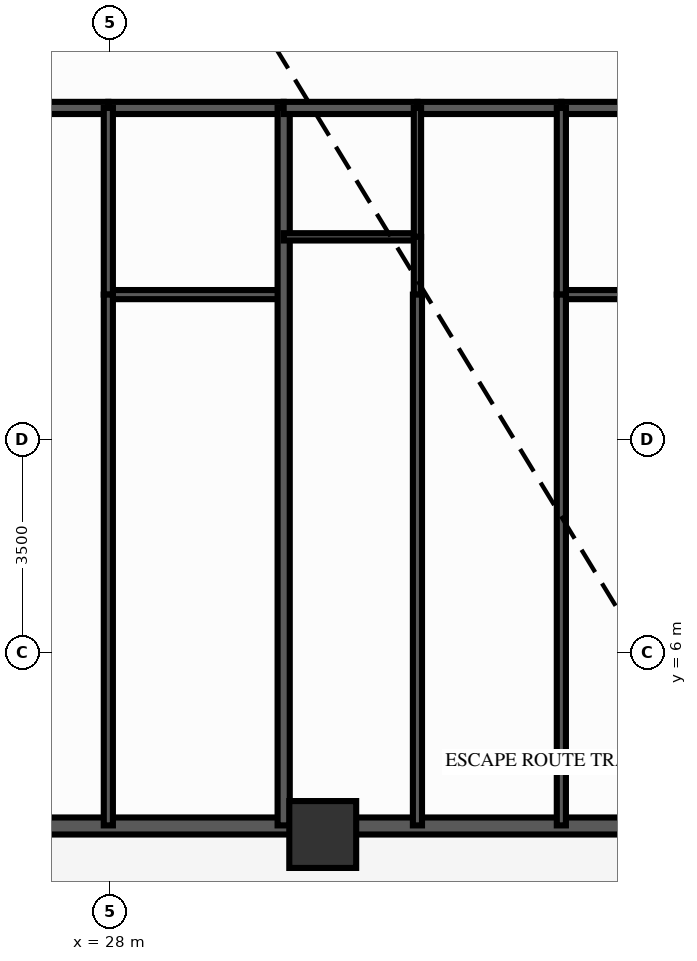
"""IFC4 building model, lengths in metres.
Left out: names, types, materials, properties, quantities, classifications, styles, units other than length and angle.
Written with IfcOpenShell. Run it as: python <this file> out.ifc"""

import sys

from ifc_helpers import new_model, si_unit, direction, frame, frame_2d, origin, origin_2d, place, context, subcontext, project, spatial, rectangle, extrude, source, transform, mapped, element, fill, save


model = new_model("IFC4")
c1 = context("Model", 3, precision=1e-05, world=origin(), true_north=direction((0.0, 1.0)))
c2 = subcontext(c1, "Body", "Model", "MODEL_VIEW")
j1 = project(units=[si_unit("LENGTHUNIT", "METRE"), si_unit("PLANEANGLEUNIT", "RADIAN")], contexts=[c1])
p1 = place(None, origin())
s1 = spatial("IfcSite", under=j1, at=p1, CompositionType="ELEMENT")
p2 = place(p1, origin())
s2 = spatial("IfcBuilding", under=s1, at=p2, CompositionType="ELEMENT")
p3 = place(p2, frame((0.0, 0.0, 19.4)))
s3 = spatial("IfcBuildingStorey", under=s2, at=p3, CompositionType="ELEMENT", Elevation=19.4)
m1 = source(origin(), c2, "Body", "SweptSolid", [
    extrude(rectangle(XDim=1.1, YDim=1.1, at=origin_2d()), origin(), (0.0, 0.0, 1.0), 3.0),
])
p4 = place(p3, frame((31.5, 3.0, 0.0), z_axis=(0.0, 0.0, 1.0), x_axis=(1.0, 0.0, 0.0)))
e1 = element("IfcColumn", 1, at=p4, inside=s3, PredefinedType="COLUMN", context=c2, shape_type="MappedRepresentation", body=[
    mapped(m1, transform((0.0, 0.0, 0.0), scale=1.0)),
])
p5 = place(p3, frame((15.5, 3.14, 0.0), z_axis=(0.0, 0.0, 1.0), x_axis=(1.0, 0.0, 0.0)))
e2 = element("IfcWall", 2, at=p5, inside=s3, PredefinedType="SOLIDWALL", context=c2, shape_type="SweptSolid", body=[
    extrude(rectangle(XDim=45.0, YDim=0.28, at=frame_2d((22.5, 0.0))), origin(), (0.0, 0.0, 1.0), 2.28),
])
p6 = place(p5, frame((0.785, 0.0, 0.25)))
e3 = element("IfcOpeningElement", 3, at=p6, cuts=e2, PredefinedType="OPENING", context=c2, shape_type="SweptSolid", body=[
    extrude(rectangle(XDim=1.2, YDim=1.5, at=frame_2d((0.6, 0.75))), frame((0.0, 0.152, 0.0), z_axis=(0.0, -1.0, 0.0), x_axis=(1.0, 0.0, 0.0)), (0.0, 0.0, 1.0), 0.304),
])
p7 = place(p5, frame((3.033, 0.0, 0.25)))
e4 = element("IfcOpeningElement", 4, at=p7, cuts=e2, PredefinedType="OPENING", context=c2, shape_type="SweptSolid", body=[
    extrude(rectangle(XDim=1.2, YDim=1.5, at=frame_2d((0.6, 0.75))), frame((0.0, 0.152, 0.0), z_axis=(0.0, -1.0, 0.0), x_axis=(1.0, 0.0, 0.0)), (0.0, 0.0, 1.0), 0.304),
])
p8 = place(p5, frame((5.727, 0.0, 0.25)))
e5 = element("IfcOpeningElement", 5, at=p8, cuts=e2, PredefinedType="OPENING", context=c2, shape_type="SweptSolid", body=[
    extrude(rectangle(XDim=1.2, YDim=1.5, at=frame_2d((0.6, 0.75))), frame((0.0, 0.152, 0.0), z_axis=(0.0, -1.0, 0.0), x_axis=(1.0, 0.0, 0.0)), (0.0, 0.0, 1.0), 0.304),
])
p9 = place(p5, frame((8.269, 0.0, 0.25)))
e6 = element("IfcOpeningElement", 6, at=p9, cuts=e2, PredefinedType="OPENING", context=c2, shape_type="SweptSolid", body=[
    extrude(rectangle(XDim=1.2, YDim=1.5, at=frame_2d((0.6, 0.75))), frame((0.0, 0.152, 0.0), z_axis=(0.0, -1.0, 0.0), x_axis=(1.0, 0.0, 0.0)), (0.0, 0.0, 1.0), 0.304),
])
p10 = place(p5, frame((10.621, 0.0, 0.25)))
e7 = element("IfcOpeningElement", 7, at=p10, cuts=e2, PredefinedType="OPENING", context=c2, shape_type="SweptSolid", body=[
    extrude(rectangle(XDim=1.2, YDim=1.5, at=frame_2d((0.6, 0.75))), frame((0.0, 0.152, 0.0), z_axis=(0.0, -1.0, 0.0), x_axis=(1.0, 0.0, 0.0)), (0.0, 0.0, 1.0), 0.304),
])
p11 = place(p5, frame((13.316, 0.0, 0.25)))
e8 = element("IfcOpeningElement", 8, at=p11, cuts=e2, PredefinedType="OPENING", context=c2, shape_type="SweptSolid", body=[
    extrude(rectangle(XDim=1.2, YDim=1.5, at=frame_2d((0.6, 0.75))), frame((0.0, 0.152, 0.0), z_axis=(0.0, -1.0, 0.0), x_axis=(1.0, 0.0, 0.0)), (0.0, 0.0, 1.0), 0.304),
])
p12 = place(p5, frame((16.624, 0.0, 0.25)))
e9 = element("IfcOpeningElement", 9, at=p12, cuts=e2, PredefinedType="OPENING", context=c2, shape_type="SweptSolid", body=[
    extrude(rectangle(XDim=0.7, YDim=1.5, at=frame_2d((0.35, 0.75))), frame((0.0, 0.152, 0.0), z_axis=(0.0, -1.0, 0.0), x_axis=(1.0, 0.0, 0.0)), (0.0, 0.0, 1.0), 0.304),
])
p13 = place(p5, frame((18.141, 0.0, 0.25)))
e10 = element("IfcOpeningElement", 10, at=p13, cuts=e2, PredefinedType="OPENING", context=c2, shape_type="SweptSolid", body=[
    extrude(rectangle(XDim=1.2, YDim=1.5, at=frame_2d((0.6, 0.75))), frame((0.0, 0.152, 0.0), z_axis=(0.0, -1.0, 0.0), x_axis=(1.0, 0.0, 0.0)), (0.0, 0.0, 1.0), 0.304),
])
p14 = place(p5, frame((21.874, 0.0, 0.0), z_axis=(0.0, 0.0, 1.0), x_axis=(-1.0, 0.0, 0.0)))
e11 = element("IfcOpeningElement", 11, at=p14, cuts=e2, PredefinedType="OPENING", context=c2, shape_type="SweptSolid", body=[
    extrude(rectangle(XDim=1.1, YDim=2.15, at=frame_2d((0.55, 1.075))), frame((0.0, 0.152, 0.0), z_axis=(0.0, -1.0, 0.0), x_axis=(1.0, 0.0, 0.0)), (0.0, 0.0, 1.0), 0.304),
])
p15 = place(p5, frame((23.223, 0.0, 0.25)))
e12 = element("IfcOpeningElement", 12, at=p15, cuts=e2, PredefinedType="OPENING", context=c2, shape_type="SweptSolid", body=[
    extrude(rectangle(XDim=1.2, YDim=1.5, at=frame_2d((0.6, 0.75))), frame((0.0, 0.152, 0.0), z_axis=(0.0, -1.0, 0.0), x_axis=(1.0, 0.0, 0.0)), (0.0, 0.0, 1.0), 0.304),
])
p16 = place(p5, frame((25.507, 0.0, 0.25)))
e13 = element("IfcOpeningElement", 13, at=p16, cuts=e2, PredefinedType="OPENING", context=c2, shape_type="SweptSolid", body=[
    extrude(rectangle(XDim=1.2, YDim=1.5, at=frame_2d((0.6, 0.75))), frame((0.0, 0.152, 0.0), z_axis=(0.0, -1.0, 0.0), x_axis=(1.0, 0.0, 0.0)), (0.0, 0.0, 1.0), 0.304),
])
p17 = place(p5, frame((27.6, 0.0, 0.25)))
e14 = element("IfcOpeningElement", 14, at=p17, cuts=e2, PredefinedType="OPENING", context=c2, shape_type="SweptSolid", body=[
    extrude(rectangle(XDim=0.7, YDim=1.5, at=frame_2d((0.35, 0.75))), frame((0.0, 0.152, 0.0), z_axis=(0.0, -1.0, 0.0), x_axis=(1.0, 0.0, 0.0)), (0.0, 0.0, 1.0), 0.304),
])
p18 = place(p5, frame((30.589, 0.0, 0.25)))
e15 = element("IfcOpeningElement", 15, at=p18, cuts=e2, PredefinedType="OPENING", context=c2, shape_type="SweptSolid", body=[
    extrude(rectangle(XDim=1.2, YDim=1.5, at=frame_2d((0.6, 0.75))), frame((0.0, 0.152, 0.0), z_axis=(0.0, -1.0, 0.0), x_axis=(1.0, 0.0, 0.0)), (0.0, 0.0, 1.0), 0.304),
])
p19 = place(p5, frame((32.872, 0.0, 0.25)))
e16 = element("IfcOpeningElement", 16, at=p19, cuts=e2, PredefinedType="OPENING", context=c2, shape_type="SweptSolid", body=[
    extrude(rectangle(XDim=1.2, YDim=1.5, at=frame_2d((0.6, 0.75))), frame((0.0, 0.152, 0.0), z_axis=(0.0, -1.0, 0.0), x_axis=(1.0, 0.0, 0.0)), (0.0, 0.0, 1.0), 0.304),
])
p20 = place(p5, frame((35.455, 0.0, 0.25)))
e17 = element("IfcOpeningElement", 17, at=p20, cuts=e2, PredefinedType="OPENING", context=c2, shape_type="SweptSolid", body=[
    extrude(rectangle(XDim=1.2, YDim=1.5, at=frame_2d((0.6, 0.75))), frame((0.0, 0.152, 0.0), z_axis=(0.0, -1.0, 0.0), x_axis=(1.0, 0.0, 0.0)), (0.0, 0.0, 1.0), 0.304),
])
p21 = place(p5, frame((37.954, 0.0, 0.25)))
e18 = element("IfcOpeningElement", 18, at=p21, cuts=e2, PredefinedType="OPENING", context=c2, shape_type="SweptSolid", body=[
    extrude(rectangle(XDim=1.2, YDim=1.5, at=frame_2d((0.6, 0.75))), frame((0.0, 0.152, 0.0), z_axis=(0.0, -1.0, 0.0), x_axis=(1.0, 0.0, 0.0)), (0.0, 0.0, 1.0), 0.304),
])
p22 = place(p5, frame((40.238, 0.0, 0.25)))
e19 = element("IfcOpeningElement", 19, at=p22, cuts=e2, PredefinedType="OPENING", context=c2, shape_type="SweptSolid", body=[
    extrude(rectangle(XDim=1.2, YDim=1.5, at=frame_2d((0.6, 0.75))), frame((0.0, 0.152, 0.0), z_axis=(0.0, -1.0, 0.0), x_axis=(1.0, 0.0, 0.0)), (0.0, 0.0, 1.0), 0.304),
])
p23 = place(p5, frame((42.716, 0.0, 0.25)))
e20 = element("IfcOpeningElement", 20, at=p23, cuts=e2, PredefinedType="OPENING", context=c2, shape_type="SweptSolid", body=[
    extrude(rectangle(XDim=1.2, YDim=1.5, at=frame_2d((0.6, 0.75))), frame((0.0, 0.152, 0.0), z_axis=(0.0, -1.0, 0.0), x_axis=(1.0, 0.0, 0.0)), (0.0, 0.0, 1.0), 0.304),
])
p24 = place(p3, frame((25.469, 14.95, 0.0), z_axis=(0.0, 0.0, 1.0), x_axis=(1.0, 0.0, 0.0)))
e21 = element("IfcWall", 21, at=p24, inside=s3, PredefinedType="PARTITIONING", context=c2, shape_type="SweptSolid", body=[
    extrude(rectangle(XDim=2.505, YDim=0.2, at=frame_2d((1.252, 0.0))), origin(), (0.0, 0.0, 1.0), 2.79),
])
p25 = place(p24, frame((0.752, 0.0, 0.0)))
e22 = element("IfcOpeningElement", 22, at=p25, cuts=e21, PredefinedType="OPENING", context=c2, shape_type="SweptSolid", body=[
    extrude(rectangle(XDim=1.0, YDim=2.15, at=frame_2d((0.5, 1.075))), frame((0.0, 0.112, 0.0), z_axis=(0.0, -1.0, 0.0), x_axis=(1.0, 0.0, 0.0)), (0.0, 0.0, 1.0), 0.224),
])
p26 = place(p3, frame((27.974, 14.95, 0.0), z_axis=(0.0, 0.0, 1.0), x_axis=(1.0, 0.0, 0.0)))
e23 = element("IfcWall", 23, at=p26, inside=s3, PredefinedType="PARTITIONING", context=c2, shape_type="SweptSolid", body=[
    extrude(rectangle(XDim=2.884, YDim=0.2, at=frame_2d((1.442, 0.0))), origin(), (0.0, 0.0, 1.0), 2.79),
])
p27 = place(p3, frame((27.974, 11.88, 0.0), z_axis=(0.0, 0.0, 1.0), x_axis=(1.0, 0.0, 0.0)))
e24 = element("IfcWall", 24, at=p27, inside=s3, PredefinedType="PARTITIONING", context=c2, shape_type="SweptSolid", body=[
    extrude(rectangle(XDim=2.884, YDim=0.15, at=frame_2d((1.442, 0.0))), origin(), (0.0, 0.0, 1.0), 2.79),
])
p28 = place(p3, frame((27.974, 14.95, 0.0), z_axis=(0.0, 0.0, 1.0), x_axis=(0.0, -1.0, 0.0)))
e25 = element("IfcWall", 25, at=p28, inside=s3, PredefinedType="PARTITIONING", context=c2, shape_type="SweptSolid", body=[
    extrude(rectangle(XDim=3.07, YDim=0.15, at=frame_2d((1.535, 0.0))), origin(), (0.0, 0.0, 1.0), 2.79),
])
p29 = place(p28, frame((1.085, 0.0, 0.0)))
e26 = element("IfcOpeningElement", 26, at=p29, cuts=e25, PredefinedType="OPENING", context=c2, shape_type="SweptSolid", body=[
    extrude(rectangle(XDim=0.9, YDim=2.1, at=frame_2d((0.45, 1.05))), frame((0.0, 0.087, 0.0), z_axis=(0.0, -1.0, 0.0), x_axis=(1.0, 0.0, 0.0)), (0.0, 0.0, 1.0), 0.174),
])
p30 = place(p3, frame((27.974, 11.88, 0.0), z_axis=(0.0, 0.0, 1.0), x_axis=(0.0, -1.0, 0.0)))
e27 = element("IfcWall", 27, at=p30, inside=s3, PredefinedType="PARTITIONING", context=c2, shape_type="SweptSolid", body=[
    extrude(rectangle(XDim=8.73, YDim=0.15, at=frame_2d((4.365, 0.0))), origin(), (0.0, 0.0, 1.0), 2.79),
])
p31 = place(p30, frame((3.609, 0.0, 0.0)))
e28 = element("IfcOpeningElement", 28, at=p31, cuts=e27, PredefinedType="OPENING", context=c2, shape_type="SweptSolid", body=[
    extrude(rectangle(XDim=0.9, YDim=2.1, at=frame_2d((0.45, 1.05))), frame((0.0, 0.087, 0.0), z_axis=(0.0, -1.0, 0.0), x_axis=(1.0, 0.0, 0.0)), (0.0, 0.0, 1.0), 0.174),
])
p32 = place(p3, frame((30.858, 14.95, 0.0), z_axis=(0.0, 0.0, 1.0), x_axis=(0.0, -1.0, 0.0)))
e29 = element("IfcWall", 29, at=p32, inside=s3, PredefinedType="PARTITIONING", context=c2, shape_type="SweptSolid", body=[
    extrude(rectangle(XDim=11.8, YDim=0.2, at=frame_2d((5.9, 0.0))), origin(), (0.0, 0.0, 1.0), 2.24),
])
p33 = place(p3, frame((30.858, 14.95, 0.0), z_axis=(0.0, 0.0, 1.0), x_axis=(1.0, 0.0, 0.0)))
e30 = element("IfcWall", 30, at=p33, inside=s3, PredefinedType="PARTITIONING", context=c2, shape_type="SweptSolid", body=[
    extrude(rectangle(XDim=2.2, YDim=0.2, at=frame_2d((1.1, 0.0))), origin(), (0.0, 0.0, 1.0), 2.79),
])
p34 = place(p3, frame((33.058, 14.95, 0.0), z_axis=(0.0, 0.0, 1.0), x_axis=(1.0, 0.0, 0.0)))
e31 = element("IfcWall", 31, at=p34, inside=s3, PredefinedType="PARTITIONING", context=c2, shape_type="SweptSolid", body=[
    extrude(rectangle(XDim=2.367, YDim=0.2, at=frame_2d((1.183, 0.0))), origin(), (0.0, 0.0, 1.0), 2.79),
])
p35 = place(p34, frame((0.683, 0.0, 0.0)))
e32 = element("IfcOpeningElement", 32, at=p35, cuts=e31, PredefinedType="OPENING", context=c2, shape_type="SweptSolid", body=[
    extrude(rectangle(XDim=1.0, YDim=2.15, at=frame_2d((0.5, 1.075))), frame((0.0, 0.112, 0.0), z_axis=(0.0, -1.0, 0.0), x_axis=(1.0, 0.0, 0.0)), (0.0, 0.0, 1.0), 0.224),
])
p36 = place(p3, frame((35.424, 14.95, 0.0), z_axis=(0.0, 0.0, 1.0), x_axis=(1.0, 0.0, 0.0)))
e33 = element("IfcWall", 33, at=p36, inside=s3, PredefinedType="PARTITIONING", context=c2, shape_type="SweptSolid", body=[
    extrude(rectangle(XDim=2.799, YDim=0.2, at=frame_2d((1.399, 0.0))), origin(), (0.0, 0.0, 1.0), 2.79),
])
p37 = place(p3, frame((30.858, 12.83, 0.0), z_axis=(0.0, 0.0, 1.0), x_axis=(1.0, 0.0, 0.0)))
e34 = element("IfcWall", 34, at=p37, inside=s3, PredefinedType="PARTITIONING", context=c2, shape_type="SweptSolid", body=[
    extrude(rectangle(XDim=2.2, YDim=0.12, at=frame_2d((1.1, 0.0))), origin(), (0.0, 0.0, 1.0), 2.79),
])
p38 = place(p3, frame((35.424, 11.88, 0.0), z_axis=(0.0, 0.0, 1.0), x_axis=(1.0, 0.0, 0.0)))
e35 = element("IfcWall", 35, at=p38, inside=s3, PredefinedType="PARTITIONING", context=c2, shape_type="SweptSolid", body=[
    extrude(rectangle(XDim=2.799, YDim=0.15, at=frame_2d((1.399, 0.0))), origin(), (0.0, 0.0, 1.0), 2.79),
])
p39 = place(p3, frame((33.058, 14.95, 0.0), z_axis=(0.0, 0.0, 1.0), x_axis=(0.0, -1.0, 0.0)))
e36 = element("IfcWall", 36, at=p39, inside=s3, PredefinedType="PARTITIONING", context=c2, shape_type="SweptSolid", body=[
    extrude(rectangle(XDim=2.12, YDim=0.12, at=frame_2d((1.06, 0.0))), origin(), (0.0, 0.0, 1.0), 2.79),
])
p40 = place(p39, frame((0.635, 0.0, 0.0)))
e37 = element("IfcOpeningElement", 37, at=p40, cuts=e36, PredefinedType="OPENING", context=c2, shape_type="SweptSolid", body=[
    extrude(rectangle(XDim=0.85, YDim=2.05, at=frame_2d((0.425, 1.025))), frame((0.0, 0.072, 0.0), z_axis=(0.0, -1.0, 0.0), x_axis=(1.0, 0.0, 0.0)), (0.0, 0.0, 1.0), 0.144),
])
p41 = place(p3, frame((33.058, 12.83, 0.0), z_axis=(0.0, 0.0, 1.0), x_axis=(0.0, -1.0, 0.0)))
e38 = element("IfcWall", 38, at=p41, inside=s3, PredefinedType="PARTITIONING", context=c2, shape_type="SweptSolid", body=[
    extrude(rectangle(XDim=0.95, YDim=0.12, at=frame_2d((0.475, 0.0))), origin(), (0.0, 0.0, 1.0), 2.79),
])
p42 = place(p3, frame((33.058, 11.88, 0.0), z_axis=(0.0, 0.0, 1.0), x_axis=(0.0, -1.0, 0.0)))
e39 = element("IfcWall", 39, at=p42, inside=s3, PredefinedType="PARTITIONING", context=c2, shape_type="SweptSolid", body=[
    extrude(rectangle(XDim=8.73, YDim=0.15, at=frame_2d((4.365, 0.0))), origin(), (0.0, 0.0, 1.0), 2.79),
])
p43 = place(p42, frame((3.609, 0.0, 0.0)))
e40 = element("IfcOpeningElement", 40, at=p43, cuts=e39, PredefinedType="OPENING", context=c2, shape_type="SweptSolid", body=[
    extrude(rectangle(XDim=0.9, YDim=2.1, at=frame_2d((0.45, 1.05))), frame((0.0, 0.087, 0.0), z_axis=(0.0, -1.0, 0.0), x_axis=(1.0, 0.0, 0.0)), (0.0, 0.0, 1.0), 0.174),
])
p44 = place(p3, frame((35.424, 14.95, 0.0), z_axis=(0.0, 0.0, 1.0), x_axis=(0.0, -1.0, 0.0)))
e41 = element("IfcWall", 41, at=p44, inside=s3, PredefinedType="PARTITIONING", context=c2, shape_type="SweptSolid", body=[
    extrude(rectangle(XDim=3.07, YDim=0.15, at=frame_2d((1.535, 0.0))), origin(), (0.0, 0.0, 1.0), 2.79),
])
p45 = place(p44, frame((1.085, 0.0, 0.0)))
e42 = element("IfcOpeningElement", 42, at=p45, cuts=e41, PredefinedType="OPENING", context=c2, shape_type="SweptSolid", body=[
    extrude(rectangle(XDim=0.9, YDim=2.1, at=frame_2d((0.45, 1.05))), frame((0.0, 0.087, 0.0), z_axis=(0.0, -1.0, 0.0), x_axis=(1.0, 0.0, 0.0)), (0.0, 0.0, 1.0), 0.174),
])
p46 = place(p3, frame((35.424, 11.88, 0.0), z_axis=(0.0, 0.0, 1.0), x_axis=(0.0, -1.0, 0.0)))
e43 = element("IfcWall", 43, at=p46, inside=s3, PredefinedType="PARTITIONING", context=c2, shape_type="SweptSolid", body=[
    extrude(rectangle(XDim=8.73, YDim=0.15, at=frame_2d((4.365, 0.0))), origin(), (0.0, 0.0, 1.0), 2.79),
])
p47 = place(p46, frame((3.609, 0.0, 0.0)))
e44 = element("IfcOpeningElement", 44, at=p47, cuts=e43, PredefinedType="OPENING", context=c2, shape_type="SweptSolid", body=[
    extrude(rectangle(XDim=0.9, YDim=2.1, at=frame_2d((0.45, 1.05))), frame((0.0, 0.087, 0.0), z_axis=(0.0, -1.0, 0.0), x_axis=(1.0, 0.0, 0.0)), (0.0, 0.0, 1.0), 0.174),
])
p48 = place(p3, frame((0.0, 0.0, -0.32)))
p49 = place(p48, frame((28.0, 1.25, 0.0)))
p50 = place(p49, frame((0.0, 0.0, 0.27)))
e45 = element("IfcWindow", 45, at=p50, inside=s3, PartitioningType="SINGLE_PANEL", PredefinedType="SKYLIGHT", context=c2, shape_type="SweptSolid", body=[
    extrude(rectangle(XDim=2.2, YDim=2.2, at=origin_2d()), origin(), (0.0, 0.0, 1.0), 0.05),
])
m2 = source(origin(), c2, "Body", "SweptSolid", [
    extrude(rectangle(XDim=1.2, YDim=1.5, at=frame_2d((0.6, 0.75))), frame((0.0, 0.03, 0.0), z_axis=(0.0, -1.0, 0.0), x_axis=(1.0, 0.0, 0.0)), (0.0, 0.0, 1.0), 0.06),
])
p51 = place(p10, origin())
e46 = element("IfcWindow", 46, at=p51, inside=s3, PartitioningType="SINGLE_PANEL", PredefinedType="WINDOW", context=c2, shape_type="MappedRepresentation", body=[
    mapped(m2, transform((0.0, 0.0, 0.0), scale=1.0)),
])
fill(e7, e46)
p52 = place(p11, origin())
e47 = element("IfcWindow", 47, at=p52, inside=s3, PartitioningType="SINGLE_PANEL", PredefinedType="WINDOW", context=c2, shape_type="MappedRepresentation", body=[
    mapped(m2, transform((0.0, 0.0, 0.0), scale=1.0)),
])
fill(e8, e47)
m3 = source(origin(), c2, "Body", "SweptSolid", [
    extrude(rectangle(XDim=0.7, YDim=1.5, at=frame_2d((0.35, 0.75))), frame((0.0, 0.03, 0.0), z_axis=(0.0, -1.0, 0.0), x_axis=(1.0, 0.0, 0.0)), (0.0, 0.0, 1.0), 0.06),
])
p53 = place(p12, origin())
e48 = element("IfcWindow", 48, at=p53, inside=s3, PartitioningType="SINGLE_PANEL", PredefinedType="WINDOW", context=c2, shape_type="MappedRepresentation", body=[
    mapped(m3, transform((0.0, 0.0, 0.0), scale=1.0)),
])
fill(e9, e48)
p54 = place(p13, origin())
e49 = element("IfcWindow", 49, at=p54, inside=s3, PartitioningType="SINGLE_PANEL", PredefinedType="WINDOW", context=c2, shape_type="MappedRepresentation", body=[
    mapped(m2, transform((0.0, 0.0, 0.0), scale=1.0)),
])
fill(e10, e49)
m4 = source(origin(), c2, "Body", "SweptSolid", [
    extrude(rectangle(XDim=1.1, YDim=2.15, at=frame_2d((0.55, 1.075))), frame((0.0, 0.025, 0.0), z_axis=(0.0, -1.0, 0.0), x_axis=(1.0, 0.0, 0.0)), (0.0, 0.0, 1.0), 0.05),
])
p55 = place(p14, origin())
e50 = element("IfcDoor", 50, at=p55, inside=s3, OperationType="SINGLE_SWING_LEFT", PredefinedType="DOOR", context=c2, shape_type="MappedRepresentation", body=[
    mapped(m4, transform((0.0, 0.0, 0.0), scale=1.0)),
])
fill(e11, e50)
m5 = source(origin(), c2, "Body", "SweptSolid", [
    extrude(rectangle(XDim=1.0, YDim=2.15, at=frame_2d((0.5, 1.075))), frame((0.0, 0.025, 0.0), z_axis=(0.0, -1.0, 0.0), x_axis=(1.0, 0.0, 0.0)), (0.0, 0.0, 1.0), 0.05),
])
p56 = place(p25, origin())
e51 = element("IfcDoor", 51, at=p56, inside=s3, OperationType="SINGLE_SWING_RIGHT", PredefinedType="DOOR", context=c2, shape_type="MappedRepresentation", body=[
    mapped(m5, transform((0.0, 0.0, 0.0), scale=1.0)),
])
fill(e22, e51)
m6 = source(origin(), c2, "Body", "SweptSolid", [
    extrude(rectangle(XDim=0.9, YDim=2.1, at=frame_2d((0.45, 1.05))), frame((0.0, 0.025, 0.0), z_axis=(0.0, -1.0, 0.0), x_axis=(1.0, 0.0, 0.0)), (0.0, 0.0, 1.0), 0.05),
])
p57 = place(p29, origin())
e52 = element("IfcDoor", 52, at=p57, inside=s3, OperationType="SINGLE_SWING_LEFT", PredefinedType="DOOR", context=c2, shape_type="MappedRepresentation", body=[
    mapped(m6, transform((0.0, 0.0, 0.0), scale=1.0)),
])
fill(e26, e52)
p58 = place(p31, origin())
e53 = element("IfcDoor", 53, at=p58, inside=s3, OperationType="SINGLE_SWING_RIGHT", PredefinedType="DOOR", context=c2, shape_type="MappedRepresentation", body=[
    mapped(m6, transform((0.0, 0.0, 0.0), scale=1.0)),
])
fill(e28, e53)
p59 = place(p35, origin())
e54 = element("IfcDoor", 54, at=p59, inside=s3, OperationType="SINGLE_SWING_LEFT", PredefinedType="DOOR", context=c2, shape_type="MappedRepresentation", body=[
    mapped(m5, transform((0.0, 0.0, 0.0), scale=1.0)),
])
fill(e32, e54)
m7 = source(origin(), c2, "Body", "SweptSolid", [
    extrude(rectangle(XDim=0.85, YDim=2.05, at=frame_2d((0.425, 1.025))), frame((0.0, 0.025, 0.0), z_axis=(0.0, -1.0, 0.0), x_axis=(1.0, 0.0, 0.0)), (0.0, 0.0, 1.0), 0.05),
])
p60 = place(p40, origin())
e55 = element("IfcDoor", 55, at=p60, inside=s3, OperationType="SINGLE_SWING_RIGHT", PredefinedType="DOOR", context=c2, shape_type="MappedRepresentation", body=[
    mapped(m7, transform((0.0, 0.0, 0.0), scale=1.0)),
])
fill(e37, e55)
p61 = place(p43, origin())
e56 = element("IfcDoor", 56, at=p61, inside=s3, OperationType="SINGLE_SWING_LEFT", PredefinedType="DOOR", context=c2, shape_type="MappedRepresentation", body=[
    mapped(m6, transform((0.0, 0.0, 0.0), scale=1.0)),
])
fill(e40, e56)
p62 = place(p45, origin())
e57 = element("IfcDoor", 57, at=p62, inside=s3, OperationType="SINGLE_SWING_RIGHT", PredefinedType="DOOR", context=c2, shape_type="MappedRepresentation", body=[
    mapped(m6, transform((0.0, 0.0, 0.0), scale=1.0)),
])
fill(e42, e57)
p63 = place(p47, origin())
e58 = element("IfcDoor", 58, at=p63, inside=s3, OperationType="SINGLE_SWING_LEFT", PredefinedType="DOOR", context=c2, shape_type="MappedRepresentation", body=[
    mapped(m6, transform((0.0, 0.0, 0.0), scale=1.0)),
])
fill(e44, e58)
save(model, sys.argv[1])
